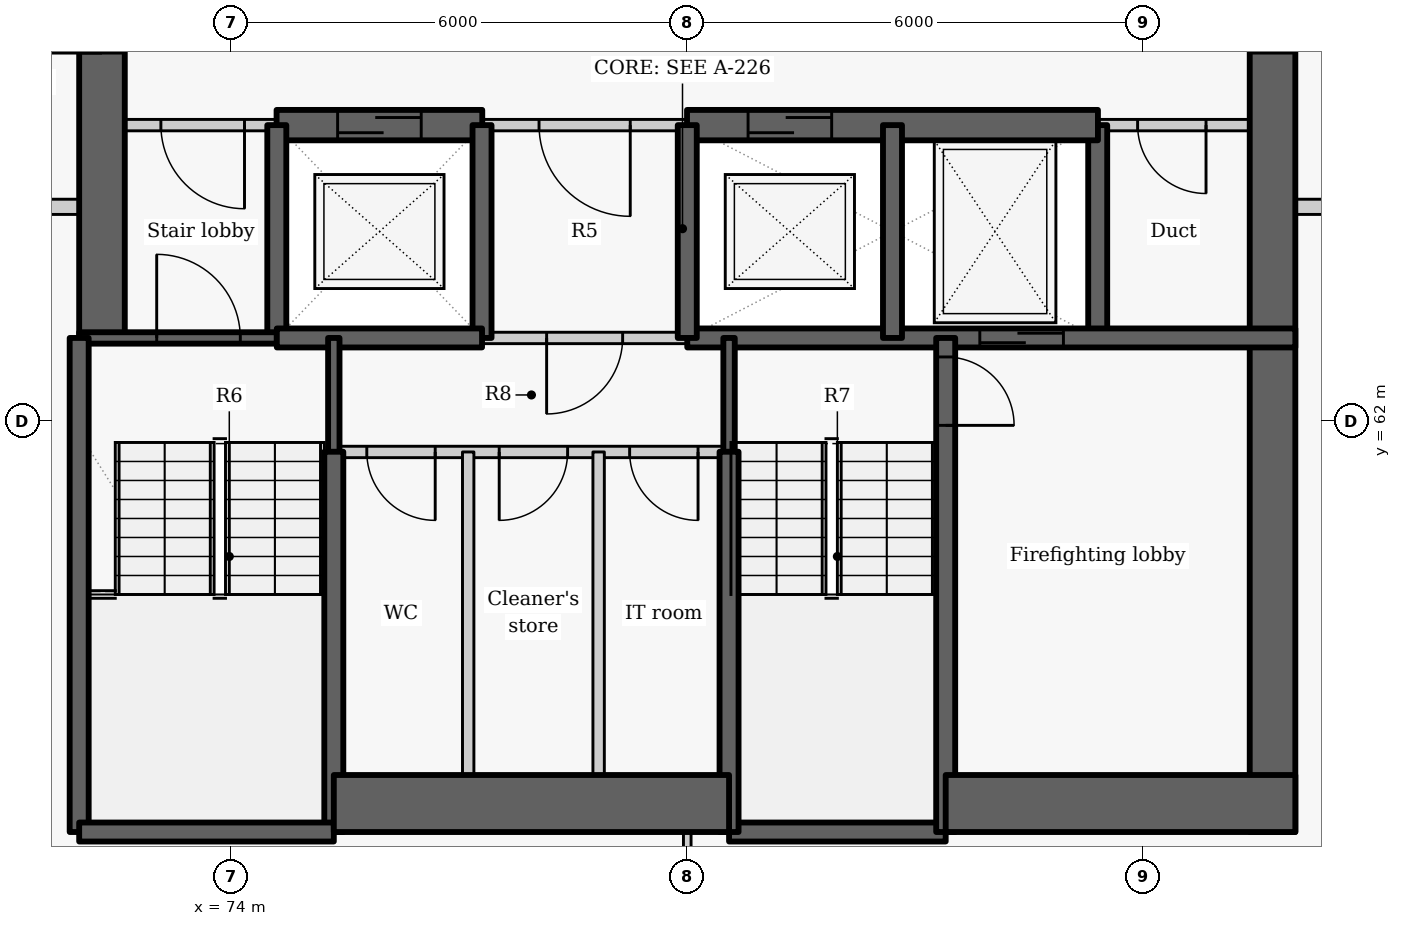
"""IFC4 building model, lengths in metres.
Left out: names, types, materials, properties, quantities, classifications, styles, units other than length and angle.
Written with IfcOpenShell. Run it as: python <this file> out.ifc"""

import sys

from ifc_helpers import new_model, si_unit, direction, frame, frame_2d, origin, place, context, subcontext, project, spatial, rectangle, extrude, element, fill, save


model = new_model("IFC4")
c1 = context("Model", 3, precision=1e-05, world=origin(), true_north=direction((0.0, 1.0)))
c2 = subcontext(c1, "Body", "Model", "MODEL_VIEW")
j1 = project(units=[si_unit("LENGTHUNIT", "METRE"), si_unit("PLANEANGLEUNIT", "RADIAN")], contexts=[c1])
p1 = place(None, origin())
s1 = spatial("IfcSite", under=j1, at=p1, CompositionType="ELEMENT")
p2 = place(p1, origin())
s2 = spatial("IfcBuilding", under=s1, at=p2, CompositionType="ELEMENT")
p3 = place(p2, frame((0.0, 0.0, 140.4)))
s3 = spatial("IfcBuildingStorey", under=s2, at=p3, CompositionType="ELEMENT", Elevation=140.4)
p4 = place(p3, frame((72.3, 63.1, -0.275), z_axis=(0.0, 0.0, 1.0), x_axis=(0.0, 1.0, 0.0)))
e1 = element("IfcWall", 1, at=p4, inside=s3, PredefinedType="SHEAR", context=c2, shape_type="SweptSolid", body=[
    extrude(rectangle(XDim=9.1, YDim=0.6, at=frame_2d((4.55, 0.0))), origin(), (0.0, 0.0, 1.0), 3.3),
])
p5 = place(p4, frame((3.748, 0.0, 0.275)))
e2 = element("IfcOpeningElement", 2, at=p5, cuts=e1, PredefinedType="OPENING", context=c2, shape_type="SweptSolid", body=[
    extrude(rectangle(XDim=1.5, YDim=2.1, at=frame_2d((0.75, 1.05))), frame((0.0, 0.31, 0.0), z_axis=(0.0, -1.0, 0.0), x_axis=(1.0, 0.0, 0.0)), (0.0, 0.0, 1.0), 0.62),
])
p6 = place(p3, frame((85.4, 63.1, -0.275), z_axis=(0.0, 0.0, 1.0), x_axis=(0.0, 1.0, 0.0)))
e3 = element("IfcWall", 3, at=p6, inside=s3, PredefinedType="SHEAR", context=c2, shape_type="SweptSolid", body=[
    extrude(rectangle(XDim=2.8, YDim=0.25, at=frame_2d((1.4, 0.0))), origin(), (0.0, 0.0, 1.0), 3.3),
])
p7 = place(p3, frame((87.7, 72.2, -0.275), z_axis=(0.0, 0.0, 1.0), x_axis=(0.0, -1.0, 0.0)))
e4 = element("IfcWall", 4, at=p7, inside=s3, PredefinedType="SHEAR", context=c2, shape_type="SweptSolid", body=[
    extrude(rectangle(XDim=15.6, YDim=0.6, at=frame_2d((7.8, 0.0))), origin(), (0.0, 0.0, 1.0), 3.3),
])
p8 = place(p7, frame((3.852, 0.0, 0.275)))
e5 = element("IfcOpeningElement", 5, at=p8, cuts=e4, PredefinedType="OPENING", context=c2, shape_type="SweptSolid", body=[
    extrude(rectangle(XDim=1.5, YDim=2.1, at=frame_2d((0.75, 1.05))), frame((0.0, 0.31, 0.0), z_axis=(0.0, -1.0, 0.0), x_axis=(1.0, 0.0, 0.0)), (0.0, 0.0, 1.0), 0.62),
])
p9 = place(p3, frame((74.603, 65.9, 0.0), z_axis=(0.0, 0.0, 1.0), x_axis=(-1.0, 0.0, 0.0)))
e6 = element("IfcWall", 6, at=p9, inside=s3, PredefinedType="PARTITIONING", context=c2, shape_type="SweptSolid", body=[
    extrude(rectangle(XDim=2.603, YDim=0.15, at=frame_2d((1.302, 0.0))), origin(), (0.0, 0.0, 1.0), 3.025),
])
p10 = place(p9, frame((0.428, 0.0, 0.0)))
e7 = element("IfcOpeningElement", 7, at=p10, cuts=e6, PredefinedType="OPENING", context=c2, shape_type="SweptSolid", body=[
    extrude(rectangle(XDim=1.1, YDim=2.1, at=frame_2d((0.55, 1.05))), frame((0.0, 0.085, 0.0), z_axis=(0.0, -1.0, 0.0), x_axis=(1.0, 0.0, 0.0)), (0.0, 0.0, 1.0), 0.17),
])
p11 = place(p3, frame((80.003, 65.9, 0.0), z_axis=(0.0, 0.0, 1.0), x_axis=(-1.0, 0.0, 0.0)))
e8 = element("IfcWall", 8, at=p11, inside=s3, PredefinedType="PARTITIONING", context=c2, shape_type="SweptSolid", body=[
    extrude(rectangle(XDim=2.706, YDim=0.15, at=frame_2d((1.353, 0.0))), origin(), (0.0, 0.0, 1.0), 3.025),
])
p12 = place(p11, frame((0.753, 0.0, 0.0)))
e9 = element("IfcOpeningElement", 9, at=p12, cuts=e8, PredefinedType="OPENING", context=c2, shape_type="SweptSolid", body=[
    extrude(rectangle(XDim=1.2, YDim=2.1, at=frame_2d((0.6, 1.05))), frame((0.0, 0.085, 0.0), z_axis=(0.0, -1.0, 0.0), x_axis=(1.0, 0.0, 0.0)), (0.0, 0.0, 1.0), 0.17),
])
p13 = place(p3, frame((88.0, 65.9, 0.0), z_axis=(0.0, 0.0, 1.0), x_axis=(-1.0, 0.0, 0.0)))
e10 = element("IfcWall", 10, at=p13, inside=s3, PredefinedType="PARTITIONING", context=c2, shape_type="SweptSolid", body=[
    extrude(rectangle(XDim=2.603, YDim=0.15, at=frame_2d((1.302, 0.0))), origin(), (0.0, 0.0, 1.0), 3.025),
])
p14 = place(p13, frame((1.175, 0.0, 0.0)))
e11 = element("IfcOpeningElement", 11, at=p14, cuts=e10, PredefinedType="OPENING", context=c2, shape_type="SweptSolid", body=[
    extrude(rectangle(XDim=0.9, YDim=2.1, at=frame_2d((0.45, 1.05))), frame((0.0, 0.085, 0.0), z_axis=(0.0, -1.0, 0.0), x_axis=(1.0, 0.0, 0.0)), (0.0, 0.0, 1.0), 0.17),
])
p15 = place(p3, frame((74.597, 65.9, -0.275), z_axis=(0.0, 0.0, 1.0), x_axis=(1.0, 0.0, 0.0)))
e12 = element("IfcWall", 12, at=p15, inside=s3, PredefinedType="SHEAR", context=c2, shape_type="SweptSolid", body=[
    extrude(rectangle(XDim=2.706, YDim=0.4, at=frame_2d((1.353, 0.0))), origin(), (0.0, 0.0, 1.0), 3.3),
])
p16 = place(p15, frame((0.803, 0.0, 0.275)))
e13 = element("IfcOpeningElement", 13, at=p16, cuts=e12, PredefinedType="OPENING", context=c2, shape_type="SweptSolid", body=[
    extrude(rectangle(XDim=1.1, YDim=2.1, at=frame_2d((0.55, 1.05))), frame((0.0, 0.21, 0.0), z_axis=(0.0, -1.0, 0.0), x_axis=(1.0, 0.0, 0.0)), (0.0, 0.0, 1.0), 0.42),
])
p17 = place(p3, frame((79.997, 65.9, -0.275), z_axis=(0.0, 0.0, 1.0), x_axis=(1.0, 0.0, 0.0)))
e14 = element("IfcWall", 14, at=p17, inside=s3, PredefinedType="SHEAR", context=c2, shape_type="SweptSolid", body=[
    extrude(rectangle(XDim=5.406, YDim=0.4, at=frame_2d((2.703, 0.0))), origin(), (0.0, 0.0, 1.0), 3.3),
])
p18 = place(p17, frame((0.803, 0.0, 0.275)))
e15 = element("IfcOpeningElement", 15, at=p18, cuts=e14, PredefinedType="OPENING", context=c2, shape_type="SweptSolid", body=[
    extrude(rectangle(XDim=1.1, YDim=2.1, at=frame_2d((0.55, 1.05))), frame((0.0, 0.21, 0.0), z_axis=(0.0, -1.0, 0.0), x_axis=(1.0, 0.0, 0.0)), (0.0, 0.0, 1.0), 0.42),
])
p19 = place(p3, frame((74.6, 63.1, -0.275), z_axis=(0.0, 0.0, 1.0), x_axis=(0.0, 1.0, 0.0)))
e16 = element("IfcWall", 16, at=p19, inside=s3, PredefinedType="SHEAR", context=c2, shape_type="SweptSolid", body=[
    extrude(rectangle(XDim=2.8, YDim=0.25, at=frame_2d((1.4, 0.0))), origin(), (0.0, 0.0, 1.0), 3.3),
])
p20 = place(p3, frame((72.0, 63.1, -0.275), z_axis=(0.0, 0.0, 1.0), x_axis=(1.0, 0.0, 0.0)))
e17 = element("IfcWall", 17, at=p20, inside=s3, PredefinedType="SHEAR", context=c2, shape_type="SweptSolid", body=[
    extrude(rectangle(XDim=2.6, YDim=0.15, at=frame_2d((1.3, 0.0))), origin(), (0.0, 0.0, 1.0), 3.3),
])
p21 = place(p20, frame((1.02, 0.0, 0.275)))
e18 = element("IfcOpeningElement", 18, at=p21, cuts=e17, PredefinedType="OPENING", context=c2, shape_type="SweptSolid", body=[
    extrude(rectangle(XDim=1.1, YDim=2.1, at=frame_2d((0.55, 1.05))), frame((0.0, 0.085, 0.0), z_axis=(0.0, -1.0, 0.0), x_axis=(1.0, 0.0, 0.0)), (0.0, 0.0, 1.0), 0.17),
])
p22 = place(p3, frame((77.3, 63.1, -0.275), z_axis=(0.0, 0.0, 1.0), x_axis=(0.0, 1.0, 0.0)))
e19 = element("IfcWall", 19, at=p22, inside=s3, PredefinedType="SHEAR", context=c2, shape_type="SweptSolid", body=[
    extrude(rectangle(XDim=2.8, YDim=0.25, at=frame_2d((1.4, 0.0))), origin(), (0.0, 0.0, 1.0), 3.3),
])
p23 = place(p3, frame((74.6, 63.1, -0.275), z_axis=(0.0, 0.0, 1.0), x_axis=(1.0, 0.0, 0.0)))
e20 = element("IfcWall", 20, at=p23, inside=s3, PredefinedType="SHEAR", context=c2, shape_type="SweptSolid", body=[
    extrude(rectangle(XDim=2.7, YDim=0.25, at=frame_2d((1.35, 0.0))), origin(), (0.0, 0.0, 1.0), 3.3),
])
p24 = place(p3, frame((80.0, 63.1, -0.275), z_axis=(0.0, 0.0, 1.0), x_axis=(1.0, 0.0, 0.0)))
e21 = element("IfcWall", 21, at=p24, inside=s3, PredefinedType="SHEAR", context=c2, shape_type="SweptSolid", body=[
    extrude(rectangle(XDim=8.0, YDim=0.25, at=frame_2d((4.0, 0.0))), origin(), (0.0, 0.0, 1.0), 3.3),
])
p25 = place(p24, frame((3.849, 0.0, 0.275)))
e22 = element("IfcOpeningElement", 22, at=p25, cuts=e21, PredefinedType="OPENING", context=c2, shape_type="SweptSolid", body=[
    extrude(rectangle(XDim=1.1, YDim=2.1, at=frame_2d((0.55, 1.05))), frame((0.0, 0.135, 0.0), z_axis=(0.0, -1.0, 0.0), x_axis=(1.0, 0.0, 0.0)), (0.0, 0.0, 1.0), 0.27),
])
p26 = place(p3, frame((80.0, 63.1, -0.275), z_axis=(0.0, 0.0, 1.0), x_axis=(0.0, 1.0, 0.0)))
e23 = element("IfcWall", 23, at=p26, inside=s3, PredefinedType="SHEAR", context=c2, shape_type="SweptSolid", body=[
    extrude(rectangle(XDim=2.8, YDim=0.25, at=frame_2d((1.4, 0.0))), origin(), (0.0, 0.0, 1.0), 3.3),
])
p27 = place(p3, frame((80.0, 63.1, 0.0), z_axis=(0.0, 0.0, 1.0), x_axis=(-1.0, 0.0, 0.0)))
e24 = element("IfcWall", 24, at=p27, inside=s3, PredefinedType="PARTITIONING", context=c2, shape_type="SweptSolid", body=[
    extrude(rectangle(XDim=2.7, YDim=0.15, at=frame_2d((1.35, 0.0))), origin(), (0.0, 0.0, 1.0), 3.025),
])
p28 = place(p27, frame((0.85, 0.0, 0.0)))
e25 = element("IfcOpeningElement", 25, at=p28, cuts=e24, PredefinedType="OPENING", context=c2, shape_type="SweptSolid", body=[
    extrude(rectangle(XDim=1.0, YDim=2.1, at=frame_2d((0.5, 1.05))), frame((0.0, 0.085, 0.0), z_axis=(0.0, -1.0, 0.0), x_axis=(1.0, 0.0, 0.0)), (0.0, 0.0, 1.0), 0.17),
])
p29 = place(p3, frame((82.7, 63.1, -0.275), z_axis=(0.0, 0.0, 1.0), x_axis=(0.0, 1.0, 0.0)))
e26 = element("IfcWall", 26, at=p29, inside=s3, PredefinedType="SHEAR", context=c2, shape_type="SweptSolid", body=[
    extrude(rectangle(XDim=2.8, YDim=0.25, at=frame_2d((1.4, 0.0))), origin(), (0.0, 0.0, 1.0), 3.3),
])
p30 = place(p3, frame((75.35, 61.597, -0.275), z_axis=(0.0, 0.0, 1.0), x_axis=(0.0, 1.0, 0.0)))
e27 = element("IfcWall", 27, at=p30, inside=s3, PredefinedType="SHEAR", context=c2, shape_type="SweptSolid", body=[
    extrude(rectangle(XDim=1.503, YDim=0.15, at=frame_2d((0.751, 0.0))), origin(), (0.0, 0.0, 1.0), 3.3),
])
p31 = place(p3, frame((75.35, 56.6, -0.275), z_axis=(0.0, 0.0, 1.0), x_axis=(0.0, 1.0, 0.0)))
e28 = element("IfcWall", 28, at=p31, inside=s3, PredefinedType="SHEAR", context=c2, shape_type="SweptSolid", body=[
    extrude(rectangle(XDim=5.003, YDim=0.25, at=frame_2d((2.501, 0.0))), origin(), (0.0, 0.0, 1.0), 3.3),
])
p32 = place(p3, frame((72.0, 56.6, -0.275), z_axis=(0.0, 0.0, 1.0), x_axis=(0.0, 1.0, 0.0)))
e29 = element("IfcWall", 29, at=p32, inside=s3, PredefinedType="SHEAR", context=c2, shape_type="SweptSolid", body=[
    extrude(rectangle(XDim=6.5, YDim=0.25, at=frame_2d((3.25, 0.0))), origin(), (0.0, 0.0, 1.0), 3.3),
])
p33 = place(p3, frame((72.0, 56.6, -0.275), z_axis=(0.0, 0.0, 1.0), x_axis=(1.0, 0.0, 0.0)))
e30 = element("IfcWall", 30, at=p33, inside=s3, PredefinedType="SHEAR", context=c2, shape_type="SweptSolid", body=[
    extrude(rectangle(XDim=3.35, YDim=0.25, at=frame_2d((1.675, 0.0))), origin(), (0.0, 0.0, 1.0), 3.3),
])
p34 = place(p3, frame((80.55, 56.6, -0.275), z_axis=(0.0, 0.0, 1.0), x_axis=(1.0, 0.0, 0.0)))
e31 = element("IfcWall", 31, at=p34, inside=s3, PredefinedType="SHEAR", context=c2, shape_type="SweptSolid", body=[
    extrude(rectangle(XDim=2.85, YDim=0.25, at=frame_2d((1.425, 0.0))), origin(), (0.0, 0.0, 1.0), 3.3),
])
p35 = place(p3, frame((83.4, 63.1, -0.275), z_axis=(0.0, 0.0, 1.0), x_axis=(0.0, -1.0, 0.0)))
e32 = element("IfcWall", 32, at=p35, inside=s3, PredefinedType="SHEAR", context=c2, shape_type="SweptSolid", body=[
    extrude(rectangle(XDim=6.5, YDim=0.25, at=frame_2d((3.25, 0.0))), origin(), (0.0, 0.0, 1.0), 3.3),
])
p36 = place(p35, frame((0.25, 0.0, 0.275)))
e33 = element("IfcOpeningElement", 33, at=p36, cuts=e32, PredefinedType="OPENING", context=c2, shape_type="SweptSolid", body=[
    extrude(rectangle(XDim=0.9, YDim=2.1, at=frame_2d((0.45, 1.05))), frame((0.0, 0.135, 0.0), z_axis=(0.0, -1.0, 0.0), x_axis=(1.0, 0.0, 0.0)), (0.0, 0.0, 1.0), 0.27),
])
p37 = place(p3, frame((80.55, 61.597, -0.275), z_axis=(0.0, 0.0, 1.0), x_axis=(0.0, 1.0, 0.0)))
e34 = element("IfcWall", 34, at=p37, inside=s3, PredefinedType="SHEAR", context=c2, shape_type="SweptSolid", body=[
    extrude(rectangle(XDim=1.503, YDim=0.15, at=frame_2d((0.751, 0.0))), origin(), (0.0, 0.0, 1.0), 3.3),
])
p38 = place(p3, frame((80.55, 56.6, -0.275), z_axis=(0.0, 0.0, 1.0), x_axis=(0.0, 1.0, 0.0)))
e35 = element("IfcWall", 35, at=p38, inside=s3, PredefinedType="SHEAR", context=c2, shape_type="SweptSolid", body=[
    extrude(rectangle(XDim=5.003, YDim=0.25, at=frame_2d((2.501, 0.0))), origin(), (0.0, 0.0, 1.0), 3.3),
])
p39 = place(p3, frame((75.35, 56.975, -0.275), z_axis=(0.0, 0.0, 1.0), x_axis=(1.0, 0.0, 0.0)))
e36 = element("IfcWall", 36, at=p39, inside=s3, PredefinedType="SHEAR", context=c2, shape_type="SweptSolid", body=[
    extrude(rectangle(XDim=5.2, YDim=0.75, at=frame_2d((2.6, 0.0))), origin(), (0.0, 0.0, 1.0), 3.3),
])
p40 = place(p3, frame((83.4, 56.975, -0.275), z_axis=(0.0, 0.0, 1.0), x_axis=(1.0, 0.0, 0.0)))
e37 = element("IfcWall", 37, at=p40, inside=s3, PredefinedType="SHEAR", context=c2, shape_type="SweptSolid", body=[
    extrude(rectangle(XDim=4.6, YDim=0.75, at=frame_2d((2.3, 0.0))), origin(), (0.0, 0.0, 1.0), 3.3),
])
p41 = place(p3, frame((80.55, 61.6, 0.0), z_axis=(0.0, 0.0, 1.0), x_axis=(-1.0, 0.0, 0.0)))
e38 = element("IfcWall", 38, at=p41, inside=s3, PredefinedType="PARTITIONING", context=c2, shape_type="SweptSolid", body=[
    extrude(rectangle(XDim=5.2, YDim=0.15, at=frame_2d((2.6, 0.0))), origin(), (0.0, 0.0, 1.0), 3.025),
])
p42 = place(p41, frame((3.866, 0.0, 0.0)))
e39 = element("IfcOpeningElement", 39, at=p42, cuts=e38, PredefinedType="OPENING", context=c2, shape_type="SweptSolid", body=[
    extrude(rectangle(XDim=0.9, YDim=2.1, at=frame_2d((0.45, 1.05))), frame((0.0, 0.085, 0.0), z_axis=(0.0, -1.0, 0.0), x_axis=(1.0, 0.0, 0.0)), (0.0, 0.0, 1.0), 0.17),
])
p43 = place(p41, frame((2.124, 0.0, 0.0)))
e40 = element("IfcOpeningElement", 40, at=p43, cuts=e38, PredefinedType="OPENING", context=c2, shape_type="SweptSolid", body=[
    extrude(rectangle(XDim=0.9, YDim=2.1, at=frame_2d((0.45, 1.05))), frame((0.0, 0.085, 0.0), z_axis=(0.0, -1.0, 0.0), x_axis=(1.0, 0.0, 0.0)), (0.0, 0.0, 1.0), 0.17),
])
p44 = place(p41, frame((0.408, 0.0, 0.0)))
e41 = element("IfcOpeningElement", 41, at=p44, cuts=e38, PredefinedType="OPENING", context=c2, shape_type="SweptSolid", body=[
    extrude(rectangle(XDim=0.9, YDim=2.1, at=frame_2d((0.45, 1.05))), frame((0.0, 0.085, 0.0), z_axis=(0.0, -1.0, 0.0), x_axis=(1.0, 0.0, 0.0)), (0.0, 0.0, 1.0), 0.17),
])
for number, where, z_axis, x_axis in (
    (42, (77.118, 56.6, 0.0), (0.0, 0.0, 1.0), (0.0, 1.0, 0.0)),
    (43, (78.834, 56.6, 0.0), (0.0, 0.0, 1.0), (0.0, 1.0, 0.0)),
):
    element("IfcWall", number, at=place(p3, frame(where, z_axis=z_axis, x_axis=x_axis)), inside=s3, PredefinedType="PARTITIONING", context=c2, shape_type="SweptSolid", body=[
        extrude(rectangle(XDim=5.0, YDim=0.15, at=frame_2d((2.5, 0.0))), origin(), (0.0, 0.0, 1.0), 3.025),
    ])
p45 = place(p3, frame((70.577, 64.825, 0.0), z_axis=(0.0, 0.0, 1.0), x_axis=(1.0, 0.0, 0.0)))
e44 = element("IfcWall", 44, at=p45, inside=s3, PredefinedType="PARTITIONING", context=c2, shape_type="SweptSolid", body=[
    extrude(rectangle(XDim=1.423, YDim=0.2, at=frame_2d((0.711, 0.0))), origin(), (0.0, 0.0, 1.0), 3.025),
])
p46 = place(p3, frame((88.0, 64.825, 0.0), z_axis=(0.0, 0.0, 1.0), x_axis=(1.0, 0.0, 0.0)))
e45 = element("IfcWall", 45, at=p46, inside=s3, PredefinedType="PARTITIONING", context=c2, shape_type="SweptSolid", body=[
    extrude(rectangle(XDim=2.463, YDim=0.2, at=frame_2d((1.231, 0.0))), origin(), (0.0, 0.0, 1.0), 2.505),
])
p47 = place(p3, frame((80.0, 56.3, 0.0), z_axis=(0.0, 0.0, 1.0), x_axis=(0.0, 1.0, 0.0)))
e46 = element("IfcWall", 46, at=p47, inside=s3, PredefinedType="PARTITIONING", context=c2, shape_type="SweptSolid", body=[
    extrude(rectangle(XDim=0.3, YDim=0.1, at=frame_2d((0.15, 0.0))), origin(), (0.0, 0.0, 1.0), 3.025),
])
p48 = place(p10, origin())
e47 = element("IfcDoor", 47, at=p48, inside=s3, OperationType="SINGLE_SWING_LEFT", PredefinedType="DOOR", context=c2, shape_type="SweptSolid", body=[
    extrude(rectangle(XDim=1.1, YDim=2.1, at=frame_2d((0.55, 1.05))), frame((0.0, 0.025, 0.0), z_axis=(0.0, -1.0, 0.0), x_axis=(1.0, 0.0, 0.0)), (0.0, 0.0, 1.0), 0.05),
])
fill(e7, e47)
p49 = place(p16, origin())
e48 = element("IfcDoor", 48, at=p49, inside=s3, OperationType="SLIDING_TO_LEFT", PredefinedType="DOOR", context=c2, shape_type="SweptSolid", body=[
    extrude(rectangle(XDim=1.1, YDim=2.1, at=frame_2d((0.55, 1.05))), frame((0.0, 0.025, 0.0), z_axis=(0.0, -1.0, 0.0), x_axis=(1.0, 0.0, 0.0)), (0.0, 0.0, 1.0), 0.05),
])
fill(e13, e48)
p50 = place(p12, origin())
e49 = element("IfcDoor", 49, at=p50, inside=s3, OperationType="DOUBLE_DOOR_SINGLE_SWING", PredefinedType="DOOR", context=c2, shape_type="SweptSolid", body=[
    extrude(rectangle(XDim=1.2, YDim=2.1, at=frame_2d((0.6, 1.05))), frame((0.0, 0.025, 0.0), z_axis=(0.0, -1.0, 0.0), x_axis=(1.0, 0.0, 0.0)), (0.0, 0.0, 1.0), 0.05),
])
fill(e9, e49)
p51 = place(p18, origin())
e50 = element("IfcDoor", 50, at=p51, inside=s3, OperationType="SLIDING_TO_LEFT", PredefinedType="DOOR", context=c2, shape_type="SweptSolid", body=[
    extrude(rectangle(XDim=1.1, YDim=2.1, at=frame_2d((0.55, 1.05))), frame((0.0, 0.025, 0.0), z_axis=(0.0, -1.0, 0.0), x_axis=(1.0, 0.0, 0.0)), (0.0, 0.0, 1.0), 0.05),
])
fill(e15, e50)
p52 = place(p25, origin())
e51 = element("IfcDoor", 51, at=p52, inside=s3, OperationType="SLIDING_TO_LEFT", PredefinedType="DOOR", context=c2, shape_type="SweptSolid", body=[
    extrude(rectangle(XDim=1.1, YDim=2.1, at=frame_2d((0.55, 1.05))), frame((0.0, 0.025, 0.0), z_axis=(0.0, -1.0, 0.0), x_axis=(1.0, 0.0, 0.0)), (0.0, 0.0, 1.0), 0.05),
])
fill(e22, e51)
p53 = place(p14, origin())
e52 = element("IfcDoor", 52, at=p53, inside=s3, OperationType="SINGLE_SWING_LEFT", PredefinedType="DOOR", context=c2, shape_type="SweptSolid", body=[
    extrude(rectangle(XDim=0.9, YDim=2.1, at=frame_2d((0.45, 1.05))), frame((0.0, 0.025, 0.0), z_axis=(0.0, -1.0, 0.0), x_axis=(1.0, 0.0, 0.0)), (0.0, 0.0, 1.0), 0.05),
])
fill(e11, e52)
p54 = place(p28, origin())
e53 = element("IfcDoor", 53, at=p54, inside=s3, OperationType="SINGLE_SWING_RIGHT", PredefinedType="DOOR", context=c2, shape_type="SweptSolid", body=[
    extrude(rectangle(XDim=1.0, YDim=2.1, at=frame_2d((0.5, 1.05))), frame((0.0, 0.025, 0.0), z_axis=(0.0, -1.0, 0.0), x_axis=(1.0, 0.0, 0.0)), (0.0, 0.0, 1.0), 0.05),
])
fill(e25, e53)
p55 = place(p42, origin())
e54 = element("IfcDoor", 54, at=p55, inside=s3, OperationType="SINGLE_SWING_LEFT", PredefinedType="DOOR", context=c2, shape_type="SweptSolid", body=[
    extrude(rectangle(XDim=0.9, YDim=2.1, at=frame_2d((0.45, 1.05))), frame((0.0, 0.025, 0.0), z_axis=(0.0, -1.0, 0.0), x_axis=(1.0, 0.0, 0.0)), (0.0, 0.0, 1.0), 0.05),
])
fill(e39, e54)
p56 = place(p43, origin())
e55 = element("IfcDoor", 55, at=p56, inside=s3, OperationType="SINGLE_SWING_RIGHT", PredefinedType="DOOR", context=c2, shape_type="SweptSolid", body=[
    extrude(rectangle(XDim=0.9, YDim=2.1, at=frame_2d((0.45, 1.05))), frame((0.0, 0.025, 0.0), z_axis=(0.0, -1.0, 0.0), x_axis=(1.0, 0.0, 0.0)), (0.0, 0.0, 1.0), 0.05),
])
fill(e40, e55)
p57 = place(p44, origin())
e56 = element("IfcDoor", 56, at=p57, inside=s3, OperationType="SINGLE_SWING_LEFT", PredefinedType="DOOR", context=c2, shape_type="SweptSolid", body=[
    extrude(rectangle(XDim=0.9, YDim=2.1, at=frame_2d((0.45, 1.05))), frame((0.0, 0.025, 0.0), z_axis=(0.0, -1.0, 0.0), x_axis=(1.0, 0.0, 0.0)), (0.0, 0.0, 1.0), 0.05),
])
fill(e41, e56)
p58 = place(p21, origin())
e57 = element("IfcDoor", 57, at=p58, inside=s3, OperationType="SINGLE_SWING_LEFT", PredefinedType="DOOR", context=c2, shape_type="SweptSolid", body=[
    extrude(rectangle(XDim=1.1, YDim=2.1, at=frame_2d((0.55, 1.05))), frame((0.0, 0.025, 0.0), z_axis=(0.0, -1.0, 0.0), x_axis=(1.0, 0.0, 0.0)), (0.0, 0.0, 1.0), 0.05),
])
fill(e18, e57)
p59 = place(p36, origin())
e58 = element("IfcDoor", 58, at=p59, inside=s3, OperationType="SINGLE_SWING_RIGHT", PredefinedType="DOOR", context=c2, shape_type="SweptSolid", body=[
    extrude(rectangle(XDim=0.9, YDim=2.1, at=frame_2d((0.45, 1.05))), frame((0.0, 0.025, 0.0), z_axis=(0.0, -1.0, 0.0), x_axis=(1.0, 0.0, 0.0)), (0.0, 0.0, 1.0), 0.05),
])
fill(e33, e58)
p60 = place(p8, origin())
e59 = element("IfcDoor", 59, at=p60, inside=s3, OperationType="DOUBLE_DOOR_SINGLE_SWING", PredefinedType="DOOR", context=c2, shape_type="SweptSolid", body=[
    extrude(rectangle(XDim=1.5, YDim=2.1, at=frame_2d((0.75, 1.05))), frame((0.0, 0.025, 0.0), z_axis=(0.0, -1.0, 0.0), x_axis=(1.0, 0.0, 0.0)), (0.0, 0.0, 1.0), 0.05),
])
fill(e5, e59)
p61 = place(p5, origin())
e60 = element("IfcDoor", 60, at=p61, inside=s3, OperationType="DOUBLE_DOOR_SINGLE_SWING", PredefinedType="DOOR", context=c2, shape_type="SweptSolid", body=[
    extrude(rectangle(XDim=1.5, YDim=2.1, at=frame_2d((0.75, 1.05))), frame((0.0, 0.025, 0.0), z_axis=(0.0, -1.0, 0.0), x_axis=(1.0, 0.0, 0.0)), (0.0, 0.0, 1.0), 0.05),
])
fill(e2, e60)
save(model, sys.argv[1])
